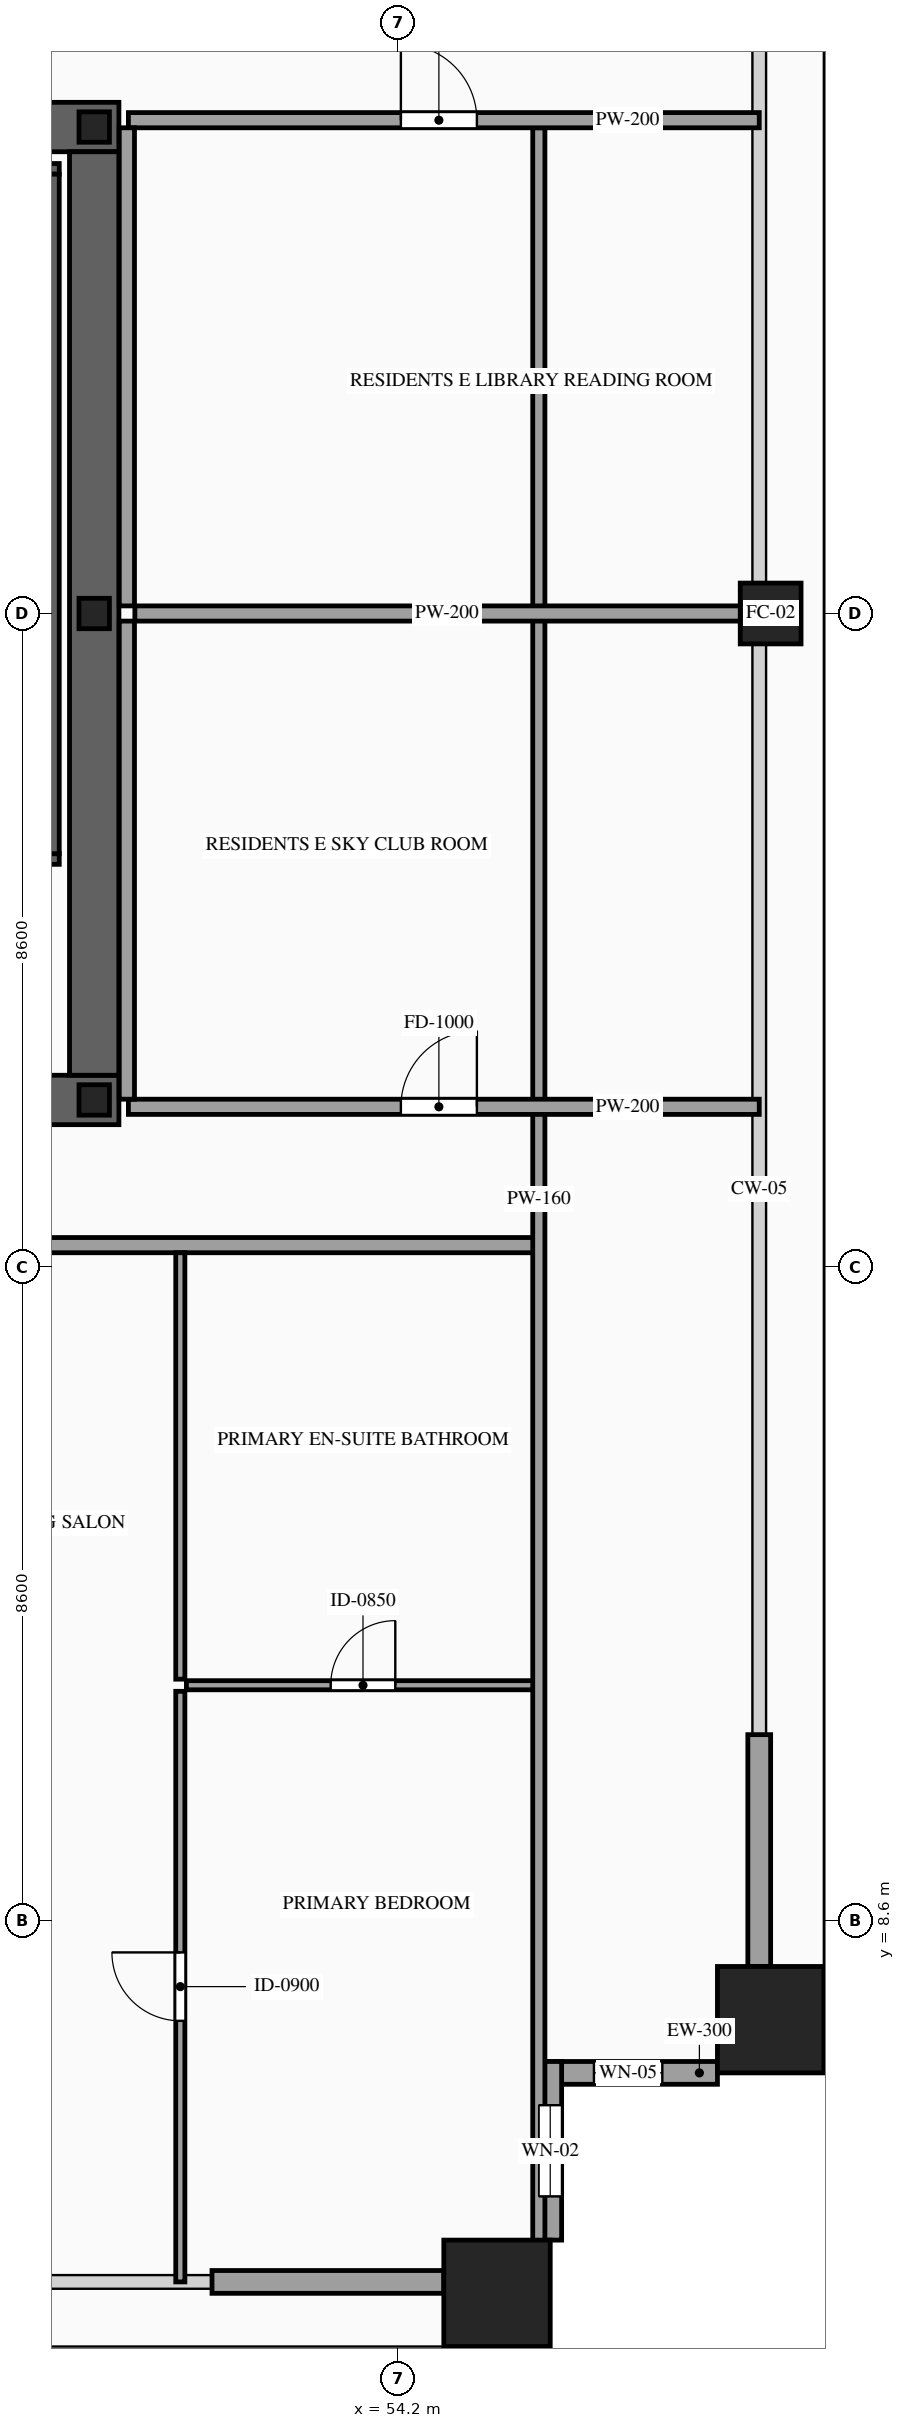
"""IFC4 building model, lengths in metres.
Left out: names, types, materials, properties, quantities, classifications, styles, units other than length and angle.
Written with IfcOpenShell. Run it as: python <this file> out.ifc"""

import sys

from ifc_helpers import new_model, si_unit, direction, frame, frame_2d, origin, origin_2d, place, context, subcontext, project, spatial, rectangle, hollow_rectangle, i_section, extrude, source, transform, mapped, element, fill, save


model = new_model("IFC4")
c1 = context("Model", 3, precision=1e-05, world=origin(), true_north=direction((0.0, 1.0)))
c2 = subcontext(c1, "Body", "Model", "MODEL_VIEW")
j1 = project(units=[si_unit("LENGTHUNIT", "METRE"), si_unit("PLANEANGLEUNIT", "RADIAN")], contexts=[c1])
p1 = place(None, origin())
s1 = spatial("IfcSite", under=j1, at=p1, CompositionType="ELEMENT")
p2 = place(p1, origin())
s2 = spatial("IfcBuilding", under=s1, at=p2, CompositionType="ELEMENT")
p3 = place(p2, frame((0.0, 0.0, 212.5)))
s3 = spatial("IfcBuildingStorey", under=s2, at=p3, CompositionType="ELEMENT", Elevation=212.5)
p4 = place(p3, frame((23.475, 19.4, 0.0), z_axis=(0.0, 0.0, 1.0), x_axis=(1.0, 0.0, 0.0)))
e1 = element("IfcWall", 1, at=p4, inside=s3, PredefinedType="SHEAR", context=c2, shape_type="SweptSolid", body=[
    extrude(rectangle(XDim=27.05, YDim=0.65, at=frame_2d((13.525, 0.0))), origin(), (0.0, 0.0, 1.0), 3.5),
])
p5 = place(p4, frame((1.975, 0.0, 0.0)))
e2 = element("IfcOpeningElement", 2, at=p5, cuts=e1, PredefinedType="OPENING", context=c2, shape_type="SweptSolid", body=[
    extrude(rectangle(XDim=1.1, YDim=2.2, at=frame_2d((0.55, 1.1))), frame((0.0, 0.34, 0.0), z_axis=(0.0, -1.0, 0.0), x_axis=(1.0, 0.0, 0.0)), (0.0, 0.0, 1.0), 0.68),
])
p6 = place(p4, frame((9.875, 0.0, 0.0)))
e3 = element("IfcOpeningElement", 3, at=p6, cuts=e1, PredefinedType="OPENING", context=c2, shape_type="SweptSolid", body=[
    extrude(rectangle(XDim=1.1, YDim=2.2, at=frame_2d((0.55, 1.1))), frame((0.0, 0.34, 0.0), z_axis=(0.0, -1.0, 0.0), x_axis=(1.0, 0.0, 0.0)), (0.0, 0.0, 1.0), 0.68),
])
p7 = place(p4, frame((23.075, 0.0, 0.0)))
e4 = element("IfcOpeningElement", 4, at=p7, cuts=e1, PredefinedType="OPENING", context=c2, shape_type="SweptSolid", body=[
    extrude(rectangle(XDim=1.1, YDim=2.2, at=frame_2d((0.55, 1.1))), frame((0.0, 0.34, 0.0), z_axis=(0.0, -1.0, 0.0), x_axis=(1.0, 0.0, 0.0)), (0.0, 0.0, 1.0), 0.68),
])
p8 = place(p4, frame((19.695, 0.0, 0.0)))
e5 = element("IfcOpeningElement", 5, at=p8, cuts=e1, PredefinedType="OPENING", context=c2, shape_type="SweptSolid", body=[
    extrude(rectangle(XDim=0.9, YDim=2.15, at=frame_2d((0.45, 1.075))), frame((0.0, 0.34, 0.0), z_axis=(0.0, -1.0, 0.0), x_axis=(1.0, 0.0, 0.0)), (0.0, 0.0, 1.0), 0.68),
])
p9 = place(p4, frame((18.255, 0.0, 0.0)))
e6 = element("IfcOpeningElement", 6, at=p9, cuts=e1, PredefinedType="OPENING", context=c2, shape_type="SweptSolid", body=[
    extrude(rectangle(XDim=0.9, YDim=2.15, at=frame_2d((0.45, 1.075))), frame((0.0, 0.34, 0.0), z_axis=(0.0, -1.0, 0.0), x_axis=(1.0, 0.0, 0.0)), (0.0, 0.0, 1.0), 0.68),
])
p10 = place(p3, frame((23.475, 32.2, 0.0), z_axis=(0.0, 0.0, 1.0), x_axis=(1.0, 0.0, 0.0)))
e7 = element("IfcWall", 7, at=p10, inside=s3, PredefinedType="SHEAR", context=c2, shape_type="SweptSolid", body=[
    extrude(rectangle(XDim=27.05, YDim=0.65, at=frame_2d((13.525, 0.0))), origin(), (0.0, 0.0, 1.0), 3.5),
])
p11 = place(p10, frame((4.595, 0.0, 0.0)))
e8 = element("IfcOpeningElement", 8, at=p11, cuts=e7, PredefinedType="OPENING", context=c2, shape_type="SweptSolid", body=[
    extrude(rectangle(XDim=0.9, YDim=2.15, at=frame_2d((0.45, 1.075))), frame((0.0, 0.34, 0.0), z_axis=(0.0, -1.0, 0.0), x_axis=(1.0, 0.0, 0.0)), (0.0, 0.0, 1.0), 0.68),
])
p12 = place(p10, frame((9.875, 0.0, 0.0)))
e9 = element("IfcOpeningElement", 9, at=p12, cuts=e7, PredefinedType="OPENING", context=c2, shape_type="SweptSolid", body=[
    extrude(rectangle(XDim=1.1, YDim=2.2, at=frame_2d((0.55, 1.1))), frame((0.0, 0.34, 0.0), z_axis=(0.0, -1.0, 0.0), x_axis=(1.0, 0.0, 0.0)), (0.0, 0.0, 1.0), 0.68),
])
p13 = place(p10, frame((15.725, 0.0, 0.0)))
e10 = element("IfcOpeningElement", 10, at=p13, cuts=e7, PredefinedType="OPENING", context=c2, shape_type="SweptSolid", body=[
    extrude(rectangle(XDim=1.1, YDim=2.2, at=frame_2d((0.55, 1.1))), frame((0.0, 0.34, 0.0), z_axis=(0.0, -1.0, 0.0), x_axis=(1.0, 0.0, 0.0)), (0.0, 0.0, 1.0), 0.68),
])
p14 = place(p10, frame((18.925, 0.0, 0.0)))
e11 = element("IfcOpeningElement", 11, at=p14, cuts=e7, PredefinedType="OPENING", context=c2, shape_type="SweptSolid", body=[
    extrude(rectangle(XDim=0.9, YDim=2.15, at=frame_2d((0.45, 1.075))), frame((0.0, 0.34, 0.0), z_axis=(0.0, -1.0, 0.0), x_axis=(1.0, 0.0, 0.0)), (0.0, 0.0, 1.0), 0.68),
])
m1 = source(origin(), c2, "Body", "SweptSolid", [
    extrude(rectangle(XDim=12.15, YDim=0.65, at=frame_2d((6.075, 0.0))), origin(), (0.0, 0.0, 1.0), 3.5),
])
p15 = place(p3, frame((50.2, 19.725, 0.0), z_axis=(0.0, 0.0, 1.0), x_axis=(0.0, 1.0, 0.0)))
e12 = element("IfcWall", 12, at=p15, inside=s3, PredefinedType="SHEAR", context=c2, shape_type="MappedRepresentation", body=[
    mapped(m1, transform((0.0, 0.0, 0.0), scale=1.0)),
])
m2 = source(origin(), c2, "Body", "SweptSolid", [
    extrude(i_section(OverallWidth=0.4, OverallDepth=0.4, WebThickness=0.013, FlangeThickness=0.021, at=origin_2d()), origin(), (0.0, 0.0, 1.0), 3.5),
])
for number, where, z_axis, x_axis in (
    (13, (50.2, 19.4, 0.0), (0.0, 0.0, 1.0), (1.0, 0.0, 0.0)),
    (14, (50.2, 25.8, 0.0), (0.0, 0.0, 1.0), (1.0, 0.0, 0.0)),
    (15, (50.2, 32.2, 0.0), (0.0, 0.0, 1.0), (1.0, 0.0, 0.0)),
):
    element("IfcColumn", number, at=place(p3, frame(where, z_axis=z_axis, x_axis=x_axis)), inside=s3, PredefinedType="COLUMN", context=c2, shape_type="MappedRepresentation", body=[
        mapped(m2, transform((0.0, 0.0, 0.0), scale=1.0)),
    ])
m3 = source(origin(), c2, "Body", "SweptSolid", [
    extrude(hollow_rectangle(XDim=1.4, YDim=1.4, WallThickness=0.06, at=origin_2d()), origin(), (0.0, 0.0, 1.0), 3.5),
])
for number, where, z_axis, x_axis in (
    (16, (55.5, 3.7, 0.0), (0.0, 0.0, 1.0), (1.0, 0.0, 0.0)),
    (17, (59.1, 7.3, 0.0), (0.0, 0.0, 1.0), (1.0, 0.0, 0.0)),
):
    element("IfcColumn", number, at=place(p3, frame(where, z_axis=z_axis, x_axis=x_axis)), inside=s3, PredefinedType="COLUMN", context=c2, shape_type="MappedRepresentation", body=[
        mapped(m3, transform((0.0, 0.0, 0.0), scale=1.0)),
    ])
m4 = source(origin(), c2, "Body", "SweptSolid", [
    extrude(hollow_rectangle(XDim=0.8, YDim=0.8, WallThickness=0.036, at=origin_2d()), origin(), (0.0, 0.0, 1.0), 3.5),
])
p16 = place(p3, frame((59.1, 25.8, 0.0), z_axis=(0.0, 0.0, 1.0), x_axis=(1.0, 0.0, 0.0)))
e18 = element("IfcColumn", 18, at=p16, inside=s3, PredefinedType="COLUMN", context=c2, shape_type="MappedRepresentation", body=[
    mapped(m4, transform((0.0, 0.0, 0.0), scale=1.0)),
])
p17 = place(p3, frame((56.05, 6.6, 0.0), z_axis=(0.0, 0.0, 1.0), x_axis=(1.0, 0.0, 0.0)))
e19 = element("IfcWall", 19, at=p17, inside=s3, PredefinedType="SOLIDWALL", context=c2, shape_type="SweptSolid", body=[
    extrude(rectangle(XDim=2.35, YDim=0.3, at=frame_2d((1.175, 0.0))), origin(), (0.0, 0.0, 1.0), 3.28),
])
p18 = place(p17, frame((0.725, 0.0, 0.85)))
e20 = element("IfcOpeningElement", 20, at=p18, cuts=e19, PredefinedType="OPENING", context=c2, shape_type="SweptSolid", body=[
    extrude(rectangle(XDim=0.9, YDim=1.5, at=frame_2d((0.45, 0.75))), frame((0.0, 0.165, 0.0), z_axis=(0.0, -1.0, 0.0), x_axis=(1.0, 0.0, 0.0)), (0.0, 0.0, 1.0), 0.33),
])
p19 = place(p3, frame((56.2, 4.4, 0.0), z_axis=(0.0, 0.0, 1.0), x_axis=(0.0, 1.0, 0.0)))
e21 = element("IfcWall", 21, at=p19, inside=s3, PredefinedType="SOLIDWALL", context=c2, shape_type="SweptSolid", body=[
    extrude(rectangle(XDim=2.35, YDim=0.3, at=frame_2d((1.175, 0.0))), origin(), (0.0, 0.0, 1.0), 3.28),
])
p20 = place(p19, frame((0.575, 0.0, 0.85)))
e22 = element("IfcOpeningElement", 22, at=p20, cuts=e21, PredefinedType="OPENING", context=c2, shape_type="SweptSolid", body=[
    extrude(rectangle(XDim=1.2, YDim=2.1, at=frame_2d((0.6, 1.05))), frame((0.0, 0.165, 0.0), z_axis=(0.0, -1.0, 0.0), x_axis=(1.0, 0.0, 0.0)), (0.0, 0.0, 1.0), 0.33),
])
m5 = source(origin(), c2, "Body", "SweptSolid", [
    extrude(rectangle(XDim=3.05, YDim=0.3, at=frame_2d((1.525, 0.0))), origin(), (0.0, 0.0, 1.0), 2.835),
])
for number, where, z_axis, x_axis in (
    (23, (51.75, 3.85, 0.0), (0.0, 0.0, 1.0), (1.0, 0.0, 0.0)),
    (24, (58.95, 8.0, 0.0), (0.0, 0.0, 1.0), (0.0, 1.0, 0.0)),
):
    element("IfcWall", number, at=place(p3, frame(where, z_axis=z_axis, x_axis=x_axis)), inside=s3, PredefinedType="SOLIDWALL", context=c2, shape_type="MappedRepresentation", body=[
        mapped(m5, transform((0.0, 0.0, 0.0), scale=1.0)),
    ])
p21 = place(p3, frame((46.46, 22.57, 0.0), z_axis=(0.0, 0.0, 1.0), x_axis=(1.0, 0.0, 0.0)))
e25 = element("IfcWall", 25, at=p21, inside=s3, PredefinedType="SOLIDWALL", context=c2, shape_type="SweptSolid", body=[
    extrude(rectangle(XDim=3.28, YDim=0.14, at=frame_2d((1.64, 0.0))), origin(), (0.0, 0.0, 1.0), 3.28),
])
p22 = place(p21, frame((1.09, 0.0, 0.0)))
e26 = element("IfcOpeningElement", 26, at=p22, cuts=e25, PredefinedType="OPENING", context=c2, shape_type="SweptSolid", body=[
    extrude(rectangle(XDim=1.1, YDim=2.2, at=frame_2d((0.55, 1.1))), frame((0.0, 0.085, 0.0), z_axis=(0.0, -1.0, 0.0), x_axis=(1.0, 0.0, 0.0)), (0.0, 0.0, 1.0), 0.17),
])
m6 = source(origin(), c2, "Body", "SweptSolid", [
    extrude(rectangle(XDim=3.28, YDim=0.14, at=frame_2d((1.64, 0.0))), origin(), (0.0, 0.0, 1.0), 3.28),
])
p23 = place(p3, frame((46.46, 31.65, 0.0), z_axis=(0.0, 0.0, 1.0), x_axis=(1.0, 0.0, 0.0)))
e27 = element("IfcWall", 27, at=p23, inside=s3, PredefinedType="SOLIDWALL", context=c2, shape_type="MappedRepresentation", body=[
    mapped(m6, transform((0.0, 0.0, 0.0), scale=1.0)),
])
m7 = source(origin(), c2, "Body", "SweptSolid", [
    extrude(rectangle(XDim=8.94, YDim=0.14, at=frame_2d((4.47, 0.0))), origin(), (0.0, 0.0, 1.0), 3.28),
])
p24 = place(p3, frame((49.67, 22.64, 0.0), z_axis=(0.0, 0.0, 1.0), x_axis=(0.0, 1.0, 0.0)))
e28 = element("IfcWall", 28, at=p24, inside=s3, PredefinedType="SOLIDWALL", context=c2, shape_type="MappedRepresentation", body=[
    mapped(m7, transform((0.0, 0.0, 0.0), scale=1.0)),
])
p25 = place(p3, frame((35.555, 17.49, 0.0), z_axis=(0.0, 0.0, 1.0), x_axis=(1.0, 0.0, 0.0)))
e29 = element("IfcWall", 29, at=p25, inside=s3, PredefinedType="PARTITIONING", context=c2, shape_type="SweptSolid", body=[
    extrude(rectangle(XDim=20.505, YDim=0.2, at=frame_2d((10.252, 0.0))), origin(), (0.0, 0.0, 1.0), 3.28),
])
p26 = place(p25, frame((12.678, 0.0, 0.0)))
e30 = element("IfcOpeningElement", 30, at=p26, cuts=e29, PredefinedType="OPENING", context=c2, shape_type="SweptSolid", body=[
    extrude(rectangle(XDim=1.0, YDim=2.2, at=frame_2d((0.5, 1.1))), frame((0.0, 0.115, 0.0), z_axis=(0.0, -1.0, 0.0), x_axis=(1.0, 0.0, 0.0)), (0.0, 0.0, 1.0), 0.23),
])
p27 = place(p3, frame((51.413, 11.7, 0.0), z_axis=(0.0, 0.0, 1.0), x_axis=(1.0, 0.0, 0.0)))
e31 = element("IfcWall", 31, at=p27, inside=s3, PredefinedType="PARTITIONING", context=c2, shape_type="SweptSolid", body=[
    extrude(rectangle(XDim=4.647, YDim=0.12, at=frame_2d((2.323, 0.0))), origin(), (0.0, 0.0, 1.0), 3.28),
])
p28 = place(p27, frame((1.898, 0.0, 0.0)))
e32 = element("IfcOpeningElement", 32, at=p28, cuts=e31, PredefinedType="OPENING", context=c2, shape_type="SweptSolid", body=[
    extrude(rectangle(XDim=0.85, YDim=2.1, at=frame_2d((0.425, 1.05))), frame((0.0, 0.075, 0.0), z_axis=(0.0, -1.0, 0.0), x_axis=(1.0, 0.0, 0.0)), (0.0, 0.0, 1.0), 0.15),
])
m8 = source(origin(), c2, "Body", "SweptSolid", [
    extrude(rectangle(XDim=5.61, YDim=0.12, at=frame_2d((2.805, 0.0))), origin(), (0.0, 0.0, 1.0), 3.28),
])
p29 = place(p3, frame((51.333, 11.78, 0.0), z_axis=(0.0, 0.0, 1.0), x_axis=(0.0, 1.0, 0.0)))
e33 = element("IfcWall", 33, at=p29, inside=s3, PredefinedType="PARTITIONING", context=c2, shape_type="MappedRepresentation", body=[
    mapped(m8, transform((0.0, 0.0, 0.0), scale=1.0)),
])
p30 = place(p3, frame((51.333, 3.85, 0.0), z_axis=(0.0, 0.0, 1.0), x_axis=(0.0, 1.0, 0.0)))
e34 = element("IfcWall", 34, at=p30, inside=s3, PredefinedType="PARTITIONING", context=c2, shape_type="SweptSolid", body=[
    extrude(rectangle(XDim=7.77, YDim=0.12, at=frame_2d((3.885, 0.0))), origin(), (0.0, 0.0, 1.0), 3.28),
])
p31 = place(p30, frame((3.435, 0.0, 0.0)))
e35 = element("IfcOpeningElement", 35, at=p31, cuts=e34, PredefinedType="OPENING", context=c2, shape_type="SweptSolid", body=[
    extrude(rectangle(XDim=0.9, YDim=2.15, at=frame_2d((0.45, 1.075))), frame((0.0, 0.075, 0.0), z_axis=(0.0, -1.0, 0.0), x_axis=(1.0, 0.0, 0.0)), (0.0, 0.0, 1.0), 0.15),
])
m9 = source(origin(), c2, "Body", "SweptSolid", [
    extrude(rectangle(XDim=28.19, YDim=0.16, at=frame_2d((14.095, 0.0))), origin(), (0.0, 0.0, 1.0), 3.28),
])
p32 = place(p3, frame((56.05, 4.0, 0.0), z_axis=(0.0, 0.0, 1.0), x_axis=(0.0, 1.0, 0.0)))
e36 = element("IfcWall", 36, at=p32, inside=s3, PredefinedType="PARTITIONING", context=c2, shape_type="MappedRepresentation", body=[
    mapped(m9, transform((0.0, 0.0, 0.0), scale=1.0)),
])
p33 = place(p3, frame((50.65, 19.31, 0.0), z_axis=(0.0, 0.0, 1.0), x_axis=(1.0, 0.0, 0.0)))
e37 = element("IfcWall", 37, at=p33, inside=s3, PredefinedType="PARTITIONING", context=c2, shape_type="SweptSolid", body=[
    extrude(rectangle(XDim=8.3, YDim=0.2, at=frame_2d((4.15, 0.0))), origin(), (0.0, 0.0, 1.0), 2.775),
])
p34 = place(p33, frame((3.585, 0.0, 0.0)))
e38 = element("IfcOpeningElement", 38, at=p34, cuts=e37, PredefinedType="OPENING", context=c2, shape_type="SweptSolid", body=[
    extrude(rectangle(XDim=1.0, YDim=2.2, at=frame_2d((0.5, 1.1))), frame((0.0, 0.115, 0.0), z_axis=(0.0, -1.0, 0.0), x_axis=(1.0, 0.0, 0.0)), (0.0, 0.0, 1.0), 0.23),
])
m10 = source(origin(), c2, "Body", "SweptSolid", [
    extrude(rectangle(XDim=8.215, YDim=0.2, at=frame_2d((4.107, 0.0))), origin(), (0.0, 0.0, 1.0), 2.687),
])
p35 = place(p3, frame((50.735, 25.8, 0.0), z_axis=(0.0, 0.0, 1.0), x_axis=(1.0, 0.0, 0.0)))
e39 = element("IfcWall", 39, at=p35, inside=s3, PredefinedType="PARTITIONING", context=c2, shape_type="MappedRepresentation", body=[
    mapped(m10, transform((0.0, 0.0, 0.0), scale=1.0)),
])
m11 = source(origin(), c2, "Body", "SweptSolid", [
    extrude(rectangle(XDim=6.29, YDim=0.2, at=frame_2d((3.145, 0.0))), origin(), (0.0, 0.0, 1.0), 3.28),
])
p36 = place(p3, frame((50.63, 19.41, 0.0), z_axis=(0.0, 0.0, 1.0), x_axis=(0.0, 1.0, 0.0)))
e40 = element("IfcWall", 40, at=p36, inside=s3, PredefinedType="PARTITIONING", context=c2, shape_type="MappedRepresentation", body=[
    mapped(m11, transform((0.0, 0.0, 0.0), scale=1.0)),
])
p37 = place(p3, frame((50.65, 32.29, 0.0), z_axis=(0.0, 0.0, 1.0), x_axis=(1.0, 0.0, 0.0)))
e41 = element("IfcWall", 41, at=p37, inside=s3, PredefinedType="PARTITIONING", context=c2, shape_type="SweptSolid", body=[
    extrude(rectangle(XDim=8.3, YDim=0.2, at=frame_2d((4.15, 0.0))), origin(), (0.0, 0.0, 1.0), 2.775),
])
p38 = place(p37, frame((3.585, 0.0, 0.0)))
e42 = element("IfcOpeningElement", 42, at=p38, cuts=e41, PredefinedType="OPENING", context=c2, shape_type="SweptSolid", body=[
    extrude(rectangle(XDim=1.0, YDim=2.2, at=frame_2d((0.5, 1.1))), frame((0.0, 0.115, 0.0), z_axis=(0.0, -1.0, 0.0), x_axis=(1.0, 0.0, 0.0)), (0.0, 0.0, 1.0), 0.23),
])
p39 = place(p3, frame((50.63, 25.9, 0.0), z_axis=(0.0, 0.0, 1.0), x_axis=(0.0, 1.0, 0.0)))
e43 = element("IfcWall", 43, at=p39, inside=s3, PredefinedType="PARTITIONING", context=c2, shape_type="MappedRepresentation", body=[
    mapped(m11, transform((0.0, 0.0, 0.0), scale=1.0)),
])
m12 = source(origin(), c2, "Body", "SweptSolid", [
    extrude(rectangle(XDim=0.9, YDim=1.5, at=frame_2d((0.45, 0.75))), frame((0.0, 0.03, 0.0), z_axis=(0.0, -1.0, 0.0), x_axis=(1.0, 0.0, 0.0)), (0.0, 0.0, 1.0), 0.06),
])
p40 = place(p18, origin())
e44 = element("IfcWindow", 44, at=p40, inside=s3, PartitioningType="SINGLE_PANEL", PredefinedType="WINDOW", context=c2, shape_type="MappedRepresentation", body=[
    mapped(m12, transform((0.0, 0.0, 0.0), scale=1.0)),
])
fill(e20, e44)
m13 = source(origin(), c2, "Body", "SweptSolid", [
    extrude(rectangle(XDim=1.2, YDim=2.1, at=frame_2d((0.6, 1.05))), frame((0.0, 0.03, 0.0), z_axis=(0.0, -1.0, 0.0), x_axis=(1.0, 0.0, 0.0)), (0.0, 0.0, 1.0), 0.06),
])
p41 = place(p20, origin())
e45 = element("IfcWindow", 45, at=p41, inside=s3, PartitioningType="SINGLE_PANEL", PredefinedType="WINDOW", context=c2, shape_type="MappedRepresentation", body=[
    mapped(m13, transform((0.0, 0.0, 0.0), scale=1.0)),
])
fill(e22, e45)
m14 = source(origin(), c2, "Body", "SweptSolid", [
    extrude(rectangle(XDim=0.85, YDim=2.1, at=frame_2d((0.425, 1.05))), frame((0.0, 0.025, 0.0), z_axis=(0.0, -1.0, 0.0), x_axis=(1.0, 0.0, 0.0)), (0.0, 0.0, 1.0), 0.05),
])
p42 = place(p28, origin())
e46 = element("IfcDoor", 46, at=p42, inside=s3, OperationType="SINGLE_SWING_RIGHT", PredefinedType="DOOR", context=c2, shape_type="MappedRepresentation", body=[
    mapped(m14, transform((0.0, 0.0, 0.0), scale=1.0)),
])
fill(e32, e46)
m15 = source(origin(), c2, "Body", "SweptSolid", [
    extrude(rectangle(XDim=0.9, YDim=2.15, at=frame_2d((0.45, 1.075))), frame((0.0, 0.025, 0.0), z_axis=(0.0, -1.0, 0.0), x_axis=(1.0, 0.0, 0.0)), (0.0, 0.0, 1.0), 0.05),
])
p43 = place(p31, origin())
e47 = element("IfcDoor", 47, at=p43, inside=s3, OperationType="SINGLE_SWING_RIGHT", PredefinedType="DOOR", context=c2, shape_type="MappedRepresentation", body=[
    mapped(m15, transform((0.0, 0.0, 0.0), scale=1.0)),
])
fill(e35, e47)
m16 = source(origin(), c2, "Body", "SweptSolid", [
    extrude(rectangle(XDim=1.0, YDim=2.2, at=frame_2d((0.5, 1.1))), frame((0.0, 0.025, 0.0), z_axis=(0.0, -1.0, 0.0), x_axis=(1.0, 0.0, 0.0)), (0.0, 0.0, 1.0), 0.05),
])
p44 = place(p34, origin())
e48 = element("IfcDoor", 48, at=p44, inside=s3, OperationType="SINGLE_SWING_RIGHT", PredefinedType="DOOR", context=c2, shape_type="MappedRepresentation", body=[
    mapped(m16, transform((0.0, 0.0, 0.0), scale=1.0)),
])
fill(e38, e48)
p45 = place(p38, origin())
e49 = element("IfcDoor", 49, at=p45, inside=s3, OperationType="SINGLE_SWING_LEFT", PredefinedType="DOOR", context=c2, shape_type="MappedRepresentation", body=[
    mapped(m16, transform((0.0, 0.0, 0.0), scale=1.0)),
])
fill(e42, e49)
save(model, sys.argv[1])
